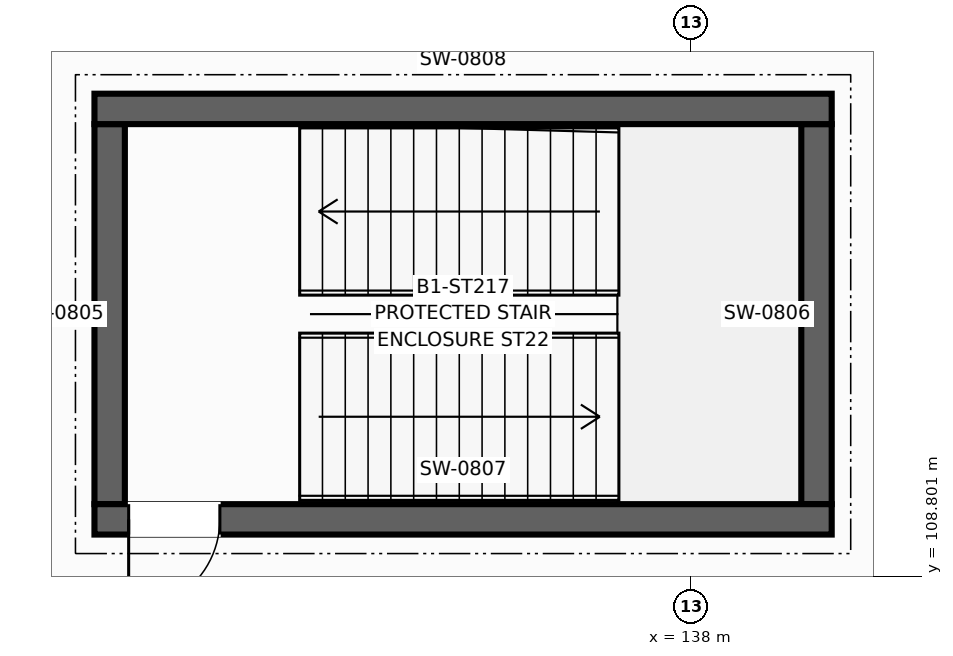
"""IFC4 building model, lengths in metres.
Left out: names, types, materials, properties, quantities, classifications, styles, units other than length and angle.
Written with IfcOpenShell. Run it as: python <this file> out.ifc"""

import sys

from ifc_helpers import new_model, si_unit, direction, frame, frame_2d, origin, place, context, subcontext, project, spatial, rectangle, extrude, element, fill, save


model = new_model("IFC4")
c1 = context("Model", 3, precision=1e-05, world=origin(), true_north=direction((0.0, 1.0)))
c2 = subcontext(c1, "Body", "Model", "MODEL_VIEW")
j1 = project(units=[si_unit("LENGTHUNIT", "METRE"), si_unit("PLANEANGLEUNIT", "RADIAN")], contexts=[c1])
p1 = place(None, origin())
s1 = spatial("IfcSite", under=j1, at=p1, CompositionType="ELEMENT")
p2 = place(p1, origin())
s2 = spatial("IfcBuilding", under=s1, at=p2, CompositionType="ELEMENT")
p3 = place(p2, frame((0.0, 0.0, -4.5)))
s3 = spatial("IfcBuildingStorey", under=s2, at=p3, CompositionType="ELEMENT", Elevation=-4.5)
for number, where, z_axis, x_axis in (
    (1, (130.35, 109.75, 0.0), (0.0, 0.0, 1.0), (0.0, 1.0, 0.0)),
    (2, (139.65, 109.75, 0.0), (0.0, 0.0, 1.0), (0.0, 1.0, 0.0)),
):
    element("IfcWall", number, at=place(p3, frame(where, z_axis=z_axis, x_axis=x_axis)), inside=s3, PredefinedType="SHEAR", context=c2, shape_type="SweptSolid", body=[
        extrude(rectangle(XDim=5.0, YDim=0.4, at=frame_2d((2.5, 0.0))), origin(), (0.0, 0.0, 1.0), 4.225),
    ])
p4 = place(p3, frame((130.15, 109.55, 0.0), z_axis=(0.0, 0.0, 1.0), x_axis=(1.0, 0.0, 0.0)))
e3 = element("IfcWall", 3, at=p4, inside=s3, PredefinedType="SHEAR", context=c2, shape_type="SweptSolid", body=[
    extrude(rectangle(XDim=9.7, YDim=0.4, at=frame_2d((4.85, 0.0))), origin(), (0.0, 0.0, 1.0), 4.225),
])
p5 = place(p4, frame((0.45, 0.0, 0.0)))
e4 = element("IfcOpeningElement", 4, at=p5, cuts=e3, PredefinedType="OPENING", context=c2, shape_type="SweptSolid", body=[
    extrude(rectangle(XDim=1.2, YDim=2.2, at=frame_2d((0.6, 1.1))), frame((0.0, 0.21, 0.0), z_axis=(0.0, -1.0, 0.0), x_axis=(1.0, 0.0, 0.0)), (0.0, 0.0, 1.0), 0.42),
])
p6 = place(p3, frame((130.15, 114.95, 0.0), z_axis=(0.0, 0.0, 1.0), x_axis=(1.0, 0.0, 0.0)))
e5 = element("IfcWall", 5, at=p6, inside=s3, PredefinedType="SHEAR", context=c2, shape_type="SweptSolid", body=[
    extrude(rectangle(XDim=9.7, YDim=0.4, at=frame_2d((4.85, 0.0))), origin(), (0.0, 0.0, 1.0), 4.225),
])
p7 = place(p5, frame((1.2, 0.0, 0.0), z_axis=(0.0, 0.0, 1.0), x_axis=(-1.0, 0.0, 0.0)))
e6 = element("IfcDoor", 6, at=p7, inside=s3, OperationType="SINGLE_SWING_LEFT", PredefinedType="DOOR", context=c2, shape_type="SweptSolid", body=[
    extrude(rectangle(XDim=1.2, YDim=2.2, at=frame_2d((0.6, 1.1))), frame((0.0, 0.025, 0.0), z_axis=(0.0, -1.0, 0.0), x_axis=(1.0, 0.0, 0.0)), (0.0, 0.0, 1.0), 0.05),
])
fill(e4, e6)
save(model, sys.argv[1])
